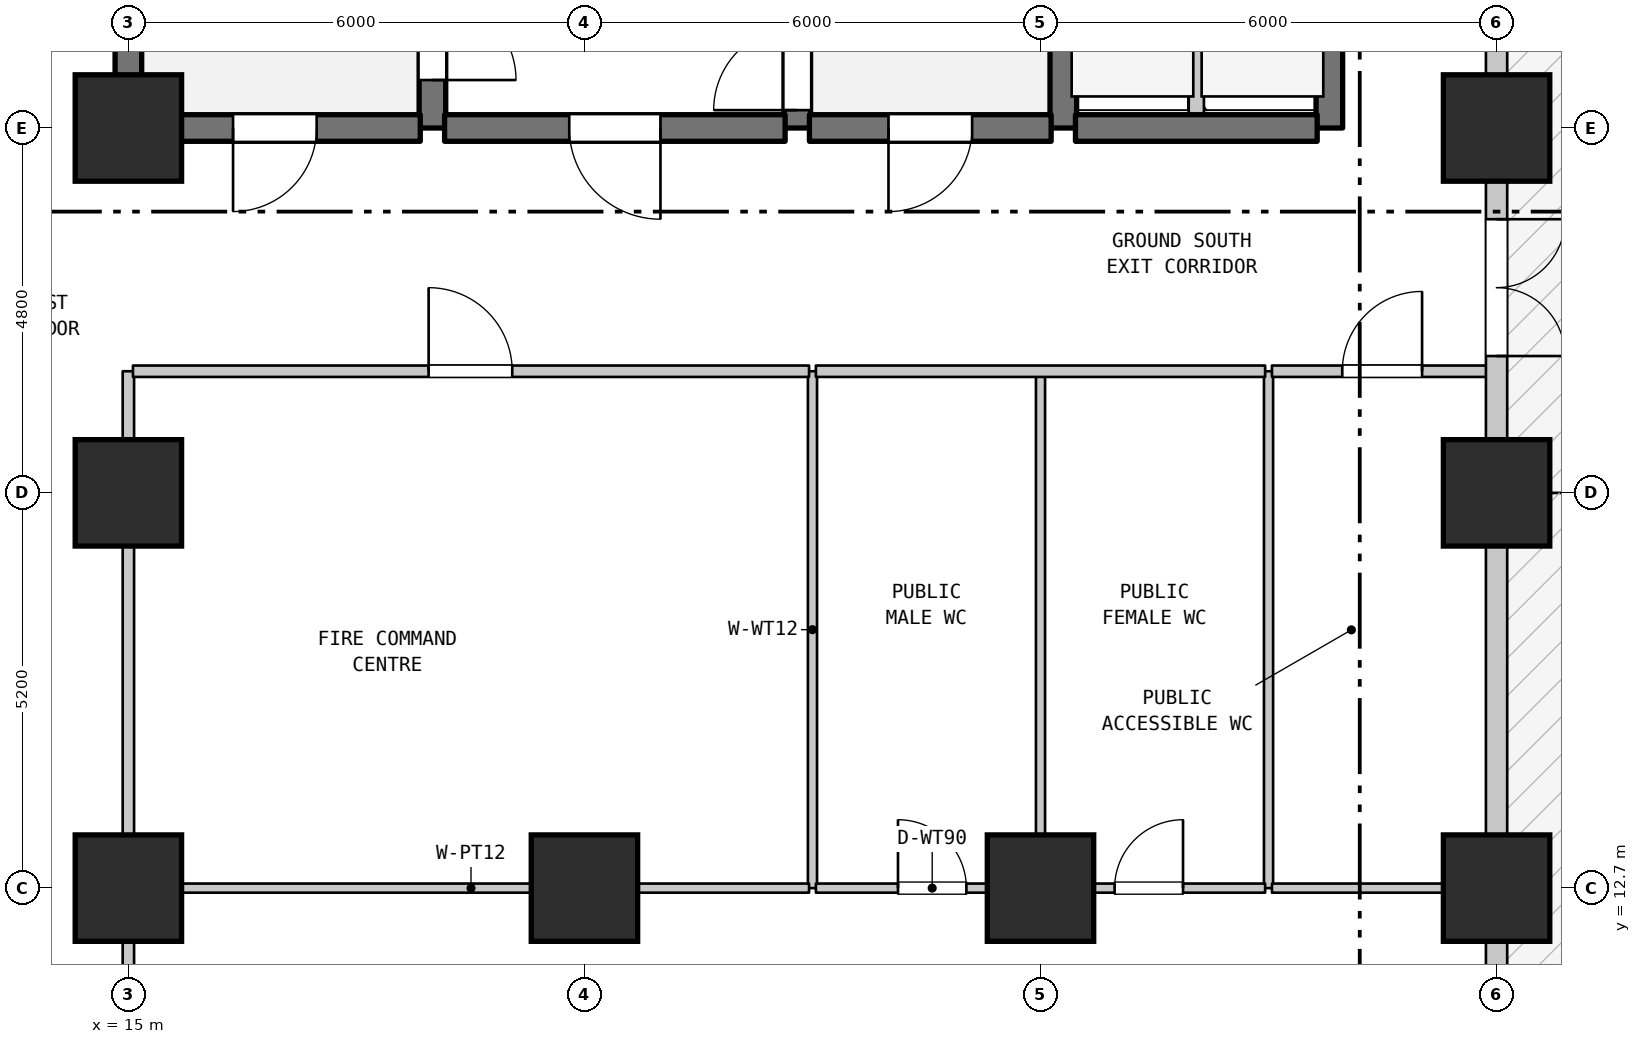
"""IFC4 building model, lengths in metres.
Left out: names, types, materials, properties, quantities, classifications, styles, units other than length and angle.
Written with IfcOpenShell. Run it as: python <this file> out.ifc"""

import sys

from ifc_helpers import new_model, si_unit, direction, frame, frame_2d, origin, origin_2d, place, context, subcontext, project, spatial, rectangle, extrude, element, fill, save


model = new_model("IFC4")
c1 = context("Model", 3, precision=1e-05, world=origin(), true_north=direction((0.0, 1.0)))
c2 = subcontext(c1, "Body", "Model", "MODEL_VIEW")
j1 = project(units=[si_unit("LENGTHUNIT", "METRE"), si_unit("PLANEANGLEUNIT", "RADIAN")], contexts=[c1])
p1 = place(None, origin())
s1 = spatial("IfcSite", under=j1, at=p1, CompositionType="ELEMENT")
p2 = place(p1, origin())
s2 = spatial("IfcBuilding", under=s1, at=p2, CompositionType="ELEMENT")
p3 = place(p2, origin())
s3 = spatial("IfcBuildingStorey", under=s2, at=p3, CompositionType="ELEMENT", Elevation=0.0)
for number, where, z_axis, x_axis in (
    (1, (15.0, 12.7, 0.0), (0.0, 0.0, 1.0), (1.0, 0.0, 0.0)),
    (2, (15.0, 17.9, 0.0), (0.0, 0.0, 1.0), (1.0, 0.0, 0.0)),
    (3, (15.0, 22.7, 0.0), (0.0, 0.0, 1.0), (1.0, 0.0, 0.0)),
    (4, (21.0, 12.7, 0.0), (0.0, 0.0, 1.0), (1.0, 0.0, 0.0)),
    (5, (27.0, 12.7, 0.0), (0.0, 0.0, 1.0), (1.0, 0.0, 0.0)),
):
    element("IfcColumn", number, at=place(p3, frame(where, z_axis=z_axis, x_axis=x_axis)), inside=s3, PredefinedType="COLUMN", context=c2, shape_type="SweptSolid", body=[
        extrude(rectangle(XDim=1.4, YDim=1.4, at=origin_2d()), origin(), (0.0, 0.0, 1.0), 6.5),
    ])
for number, where, z_axis, x_axis in (
    (6, (33.0, 12.7, 0.0), (0.0, 0.0, 1.0), (1.0, 0.0, 0.0)),
    (7, (33.0, 17.9, 0.0), (0.0, 0.0, 1.0), (1.0, 0.0, 0.0)),
    (8, (33.0, 22.7, 0.0), (0.0, 0.0, 1.0), (1.0, 0.0, 0.0)),
):
    element("IfcColumn", number, at=place(p3, frame(where, z_axis=z_axis, x_axis=x_axis)), inside=s3, PredefinedType="PILASTER", context=c2, shape_type="SweptSolid", body=[
        extrude(rectangle(XDim=1.4, YDim=1.4, at=origin_2d()), origin(), (0.0, 0.0, 1.0), 6.5),
    ])
p4 = place(p3, frame((15.0, 0.71, 0.0), z_axis=(0.0, 0.0, 1.0), x_axis=(0.0, 1.0, 0.0)))
e9 = element("IfcWall", 9, at=p4, inside=s3, PredefinedType="STANDARD", context=c2, shape_type="SweptSolid", body=[
    extrude(rectangle(XDim=11.99, YDim=0.15, at=frame_2d((5.995, 0.0))), origin(), (0.0, 0.0, 1.0), 6.17),
])
p5 = place(p4, frame((5.119, 0.0, 0.0)))
e10 = element("IfcOpeningElement", 10, at=p5, cuts=e9, PredefinedType="OPENING", context=c2, shape_type="SweptSolid", body=[
    extrude(rectangle(XDim=1.2, YDim=2.2, at=frame_2d((0.6, 1.1))), frame((0.0, 0.085, 0.0), z_axis=(0.0, -1.0, 0.0), x_axis=(1.0, 0.0, 0.0)), (0.0, 0.0, 1.0), 0.17),
])
p6 = place(p3, frame((15.0, 12.7, 0.0), z_axis=(0.0, 0.0, 1.0), x_axis=(0.0, 1.0, 0.0)))
e11 = element("IfcWall", 11, at=p6, inside=s3, PredefinedType="STANDARD", context=c2, shape_type="SweptSolid", body=[
    extrude(rectangle(XDim=6.8, YDim=0.15, at=frame_2d((3.4, 0.0))), origin(), (0.0, 0.0, 1.0), 5.67),
])
p7 = place(p3, frame((15.0, 22.7, 0.0), z_axis=(0.0, 0.0, 1.0), x_axis=(0.0, 1.0, 0.0)))
e12 = element("IfcWall", 12, at=p7, inside=s3, PredefinedType="SHEAR", context=c2, shape_type="SweptSolid", body=[
    extrude(rectangle(XDim=6.8, YDim=0.35, at=frame_2d((3.4, 0.0))), origin(), (0.0, 0.0, 1.0), 6.17),
])
p8 = place(p3, frame((19.0, 22.7, 0.0), z_axis=(0.0, 0.0, 1.0), x_axis=(0.0, 1.0, 0.0)))
e13 = element("IfcWall", 13, at=p8, inside=s3, PredefinedType="SHEAR", context=c2, shape_type="SweptSolid", body=[
    extrude(rectangle(XDim=5.5, YDim=0.35, at=frame_2d((2.75, 0.0))), origin(), (0.0, 0.0, 1.0), 6.17),
])
p9 = place(p8, frame((0.631, 0.0, 0.0)))
e14 = element("IfcOpeningElement", 14, at=p9, cuts=e13, PredefinedType="OPENING", context=c2, shape_type="SweptSolid", body=[
    extrude(rectangle(XDim=1.1, YDim=2.15, at=frame_2d((0.55, 1.075))), frame((0.0, 0.185, 0.0), z_axis=(0.0, -1.0, 0.0), x_axis=(1.0, 0.0, 0.0)), (0.0, 0.0, 1.0), 0.37),
])
p10 = place(p3, frame((23.8, 22.7, 0.0), z_axis=(0.0, 0.0, 1.0), x_axis=(0.0, 1.0, 0.0)))
e15 = element("IfcWall", 15, at=p10, inside=s3, PredefinedType="SHEAR", context=c2, shape_type="SweptSolid", body=[
    extrude(rectangle(XDim=5.5, YDim=0.35, at=frame_2d((2.75, 0.0))), origin(), (0.0, 0.0, 1.0), 6.17),
])
p11 = place(p10, frame((0.235, 0.0, 0.0)))
e16 = element("IfcOpeningElement", 16, at=p11, cuts=e15, PredefinedType="OPENING", context=c2, shape_type="SweptSolid", body=[
    extrude(rectangle(XDim=1.1, YDim=2.15, at=frame_2d((0.55, 1.075))), frame((0.0, 0.185, 0.0), z_axis=(0.0, -1.0, 0.0), x_axis=(1.0, 0.0, 0.0)), (0.0, 0.0, 1.0), 0.37),
])
for number, where, z_axis, x_axis in (
    (17, (24.0, 12.7, 0.0), (0.0, 0.0, 1.0), (0.0, 1.0, 0.0)),
    (18, (27.0, 12.7, 0.0), (0.0, 0.0, 1.0), (0.0, 1.0, 0.0)),
):
    element("IfcWall", number, at=place(p3, frame(where, z_axis=z_axis, x_axis=x_axis)), inside=s3, PredefinedType="PARTITIONING", context=c2, shape_type="SweptSolid", body=[
        extrude(rectangle(XDim=6.8, YDim=0.12, at=frame_2d((3.4, 0.0))), origin(), (0.0, 0.0, 1.0), 6.17),
    ])
p12 = place(p3, frame((27.3, 22.7, 0.0), z_axis=(0.0, 0.0, 1.0), x_axis=(0.0, 1.0, 0.0)))
e19 = element("IfcWall", 19, at=p12, inside=s3, PredefinedType="SHEAR", context=c2, shape_type="SweptSolid", body=[
    extrude(rectangle(XDim=2.9, YDim=0.35, at=frame_2d((1.45, 0.0))), origin(), (0.0, 0.0, 1.0), 6.17),
])
p13 = place(p3, frame((29.05, 22.7, 0.0), z_axis=(0.0, 0.0, 1.0), x_axis=(0.0, 1.0, 0.0)))
e20 = element("IfcWall", 20, at=p13, inside=s3, PredefinedType="STANDARD", context=c2, shape_type="SweptSolid", body=[
    extrude(rectangle(XDim=2.9, YDim=0.2, at=frame_2d((1.45, 0.0))), origin(), (0.0, 0.0, 1.0), 6.17),
])
p14 = place(p3, frame((30.0, 12.7, 0.0), z_axis=(0.0, 0.0, 1.0), x_axis=(0.0, 1.0, 0.0)))
e21 = element("IfcWall", 21, at=p14, inside=s3, PredefinedType="PARTITIONING", context=c2, shape_type="SweptSolid", body=[
    extrude(rectangle(XDim=6.8, YDim=0.12, at=frame_2d((3.4, 0.0))), origin(), (0.0, 0.0, 1.0), 6.17),
])
p15 = place(p3, frame((30.8, 22.7, 0.0), z_axis=(0.0, 0.0, 1.0), x_axis=(0.0, 1.0, 0.0)))
e22 = element("IfcWall", 22, at=p15, inside=s3, PredefinedType="SHEAR", context=c2, shape_type="SweptSolid", body=[
    extrude(rectangle(XDim=2.9, YDim=0.35, at=frame_2d((1.45, 0.0))), origin(), (0.0, 0.0, 1.0), 6.17),
])
p16 = place(p3, frame((15.06, 12.7, 0.0), z_axis=(0.0, 0.0, 1.0), x_axis=(1.0, 0.0, 0.0)))
e23 = element("IfcWall", 23, at=p16, inside=s3, PredefinedType="PARTITIONING", context=c2, shape_type="SweptSolid", body=[
    extrude(rectangle(XDim=8.895, YDim=0.12, at=frame_2d((4.448, 0.0))), origin(), (0.0, 0.0, 1.0), 6.17),
])
p17 = place(p3, frame((24.045, 12.7, 0.0), z_axis=(0.0, 0.0, 1.0), x_axis=(1.0, 0.0, 0.0)))
e24 = element("IfcWall", 24, at=p17, inside=s3, PredefinedType="PARTITIONING", context=c2, shape_type="SweptSolid", body=[
    extrude(rectangle(XDim=5.91, YDim=0.12, at=frame_2d((2.955, 0.0))), origin(), (0.0, 0.0, 1.0), 6.17),
])
p18 = place(p17, frame((1.08, 0.0, 0.0)))
e25 = element("IfcOpeningElement", 25, at=p18, cuts=e24, PredefinedType="OPENING", context=c2, shape_type="SweptSolid", body=[
    extrude(rectangle(XDim=0.9, YDim=2.1, at=frame_2d((0.45, 1.05))), frame((0.0, 0.07, 0.0), z_axis=(0.0, -1.0, 0.0), x_axis=(1.0, 0.0, 0.0)), (0.0, 0.0, 1.0), 0.14),
])
p19 = place(p17, frame((3.93, 0.0, 0.0)))
e26 = element("IfcOpeningElement", 26, at=p19, cuts=e24, PredefinedType="OPENING", context=c2, shape_type="SweptSolid", body=[
    extrude(rectangle(XDim=0.9, YDim=2.1, at=frame_2d((0.45, 1.05))), frame((0.0, 0.07, 0.0), z_axis=(0.0, -1.0, 0.0), x_axis=(1.0, 0.0, 0.0)), (0.0, 0.0, 1.0), 0.14),
])
p20 = place(p3, frame((30.045, 12.7, 0.0), z_axis=(0.0, 0.0, 1.0), x_axis=(1.0, 0.0, 0.0)))
e27 = element("IfcWall", 27, at=p20, inside=s3, PredefinedType="PARTITIONING", context=c2, shape_type="SweptSolid", body=[
    extrude(rectangle(XDim=2.945, YDim=0.12, at=frame_2d((1.473, 0.0))), origin(), (0.0, 0.0, 1.0), 6.17),
])
p21 = place(p3, frame((15.06, 19.5, 0.0), z_axis=(0.0, 0.0, 1.0), x_axis=(1.0, 0.0, 0.0)))
e28 = element("IfcWall", 28, at=p21, inside=s3, PredefinedType="STANDARD", context=c2, shape_type="SweptSolid", body=[
    extrude(rectangle(XDim=8.895, YDim=0.15, at=frame_2d((4.448, 0.0))), origin(), (0.0, 0.0, 1.0), 6.17),
])
p22 = place(p21, frame((3.89, 0.0, 0.0)))
e29 = element("IfcOpeningElement", 29, at=p22, cuts=e28, PredefinedType="OPENING", context=c2, shape_type="SweptSolid", body=[
    extrude(rectangle(XDim=1.1, YDim=2.15, at=frame_2d((0.55, 1.075))), frame((0.0, 0.085, 0.0), z_axis=(0.0, -1.0, 0.0), x_axis=(1.0, 0.0, 0.0)), (0.0, 0.0, 1.0), 0.17),
])
p23 = place(p3, frame((24.045, 19.5, 0.0), z_axis=(0.0, 0.0, 1.0), x_axis=(1.0, 0.0, 0.0)))
e30 = element("IfcWall", 30, at=p23, inside=s3, PredefinedType="STANDARD", context=c2, shape_type="SweptSolid", body=[
    extrude(rectangle(XDim=5.91, YDim=0.15, at=frame_2d((2.955, 0.0))), origin(), (0.0, 0.0, 1.0), 6.17),
])
p24 = place(p3, frame((30.045, 19.5, 0.0), z_axis=(0.0, 0.0, 1.0), x_axis=(1.0, 0.0, 0.0)))
e31 = element("IfcWall", 31, at=p24, inside=s3, PredefinedType="STANDARD", context=c2, shape_type="SweptSolid", body=[
    extrude(rectangle(XDim=2.945, YDim=0.15, at=frame_2d((1.473, 0.0))), origin(), (0.0, 0.0, 1.0), 6.17),
])
p25 = place(p24, frame((0.925, 0.0, 0.0)))
e32 = element("IfcOpeningElement", 32, at=p25, cuts=e31, PredefinedType="OPENING", context=c2, shape_type="SweptSolid", body=[
    extrude(rectangle(XDim=1.05, YDim=2.15, at=frame_2d((0.525, 1.075))), frame((0.0, 0.085, 0.0), z_axis=(0.0, -1.0, 0.0), x_axis=(1.0, 0.0, 0.0)), (0.0, 0.0, 1.0), 0.17),
])
p26 = place(p3, frame((15.16, 22.7, 0.0), z_axis=(0.0, 0.0, 1.0), x_axis=(1.0, 0.0, 0.0)))
e33 = element("IfcWall", 33, at=p26, inside=s3, PredefinedType="SHEAR", context=c2, shape_type="SweptSolid", body=[
    extrude(rectangle(XDim=3.68, YDim=0.35, at=frame_2d((1.84, 0.0))), origin(), (0.0, 0.0, 1.0), 6.17),
])
p27 = place(p26, frame((1.217, 0.0, 0.0)))
e34 = element("IfcOpeningElement", 34, at=p27, cuts=e33, PredefinedType="OPENING", context=c2, shape_type="SweptSolid", body=[
    extrude(rectangle(XDim=1.1, YDim=2.15, at=frame_2d((0.55, 1.075))), frame((0.0, 0.185, 0.0), z_axis=(0.0, -1.0, 0.0), x_axis=(1.0, 0.0, 0.0)), (0.0, 0.0, 1.0), 0.37),
])
p28 = place(p3, frame((19.16, 22.7, 0.0), z_axis=(0.0, 0.0, 1.0), x_axis=(1.0, 0.0, 0.0)))
e35 = element("IfcWall", 35, at=p28, inside=s3, PredefinedType="SHEAR", context=c2, shape_type="SweptSolid", body=[
    extrude(rectangle(XDim=4.48, YDim=0.35, at=frame_2d((2.24, 0.0))), origin(), (0.0, 0.0, 1.0), 6.17),
])
p29 = place(p28, frame((1.64, 0.0, 0.0)))
e36 = element("IfcOpeningElement", 36, at=p29, cuts=e35, PredefinedType="OPENING", context=c2, shape_type="SweptSolid", body=[
    extrude(rectangle(XDim=1.2, YDim=2.2, at=frame_2d((0.6, 1.1))), frame((0.0, 0.185, 0.0), z_axis=(0.0, -1.0, 0.0), x_axis=(1.0, 0.0, 0.0)), (0.0, 0.0, 1.0), 0.37),
])
p30 = place(p3, frame((23.96, 22.7, 0.0), z_axis=(0.0, 0.0, 1.0), x_axis=(1.0, 0.0, 0.0)))
e37 = element("IfcWall", 37, at=p30, inside=s3, PredefinedType="SHEAR", context=c2, shape_type="SweptSolid", body=[
    extrude(rectangle(XDim=3.18, YDim=0.35, at=frame_2d((1.59, 0.0))), origin(), (0.0, 0.0, 1.0), 6.17),
])
p31 = place(p30, frame((1.04, 0.0, 0.0)))
e38 = element("IfcOpeningElement", 38, at=p31, cuts=e37, PredefinedType="OPENING", context=c2, shape_type="SweptSolid", body=[
    extrude(rectangle(XDim=1.1, YDim=2.15, at=frame_2d((0.55, 1.075))), frame((0.0, 0.185, 0.0), z_axis=(0.0, -1.0, 0.0), x_axis=(1.0, 0.0, 0.0)), (0.0, 0.0, 1.0), 0.37),
])
p32 = place(p3, frame((27.46, 22.7, 0.0), z_axis=(0.0, 0.0, 1.0), x_axis=(1.0, 0.0, 0.0)))
e39 = element("IfcWall", 39, at=p32, inside=s3, PredefinedType="SHEAR", context=c2, shape_type="SweptSolid", body=[
    extrude(rectangle(XDim=3.18, YDim=0.35, at=frame_2d((1.59, 0.0))), origin(), (0.0, 0.0, 1.0), 6.17),
])
p33 = place(p3, frame((33.0, 27.9, 0.0), z_axis=(0.0, 0.0, 1.0), x_axis=(0.0, -1.0, 0.0)))
e40 = element("IfcWall", 40, at=p33, inside=s3, PredefinedType="STANDARD", context=c2, shape_type="SweptSolid", body=[
    extrude(rectangle(XDim=27.2, YDim=0.28, at=frame_2d((13.6, 0.0))), origin(), (0.0, 0.0, 1.0), 5.67),
])
p34 = place(p33, frame((17.3, 0.0, 0.0)))
e41 = element("IfcOpeningElement", 41, at=p34, cuts=e40, PredefinedType="OPENING", context=c2, shape_type="SweptSolid", body=[
    extrude(rectangle(XDim=1.8, YDim=2.4, at=frame_2d((0.9, 1.2))), frame((0.0, 0.15, 0.0), z_axis=(0.0, -1.0, 0.0), x_axis=(1.0, 0.0, 0.0)), (0.0, 0.0, 1.0), 0.3),
])
p35 = place(p33, frame((6.4, 0.0, 0.0)))
e42 = element("IfcOpeningElement", 42, at=p35, cuts=e40, PredefinedType="OPENING", context=c2, shape_type="SweptSolid", body=[
    extrude(rectangle(XDim=1.8, YDim=2.4, at=frame_2d((0.9, 1.2))), frame((0.0, 0.15, 0.0), z_axis=(0.0, -1.0, 0.0), x_axis=(1.0, 0.0, 0.0)), (0.0, 0.0, 1.0), 0.3),
])
p36 = place(p33, frame((1.338, 0.0, 0.9)))
e43 = element("IfcOpeningElement", 43, at=p36, cuts=e40, PredefinedType="OPENING", context=c2, shape_type="SweptSolid", body=[
    extrude(rectangle(XDim=2.4, YDim=2.4, at=frame_2d((1.2, 1.2))), frame((0.0, 0.15, 0.0), z_axis=(0.0, -1.0, 0.0), x_axis=(1.0, 0.0, 0.0)), (0.0, 0.0, 1.0), 0.3),
])
p37 = place(p33, frame((22.762, 0.0, 0.9)))
e44 = element("IfcOpeningElement", 44, at=p37, cuts=e40, PredefinedType="OPENING", context=c2, shape_type="SweptSolid", body=[
    extrude(rectangle(XDim=2.4, YDim=2.4, at=frame_2d((1.2, 1.2))), frame((0.0, 0.15, 0.0), z_axis=(0.0, -1.0, 0.0), x_axis=(1.0, 0.0, 0.0)), (0.0, 0.0, 1.0), 0.3),
])
p38 = place(p35, origin())
e45 = element("IfcDoor", 45, at=p38, inside=s3, OperationType="DOUBLE_DOOR_SINGLE_SWING", PredefinedType="DOOR", context=c2, shape_type="SweptSolid", body=[
    extrude(rectangle(XDim=1.8, YDim=2.4, at=frame_2d((0.9, 1.2))), frame((0.0, 0.025, 0.0), z_axis=(0.0, -1.0, 0.0), x_axis=(1.0, 0.0, 0.0)), (0.0, 0.0, 1.0), 0.05),
])
fill(e42, e45)
p39 = place(p9, frame((1.1, 0.0, 0.0), z_axis=(0.0, 0.0, 1.0), x_axis=(-1.0, 0.0, 0.0)))
e46 = element("IfcDoor", 46, at=p39, inside=s3, OperationType="SINGLE_SWING_LEFT", PredefinedType="DOOR", context=c2, shape_type="SweptSolid", body=[
    extrude(rectangle(XDim=1.1, YDim=2.15, at=frame_2d((0.55, 1.075))), frame((0.0, 0.025, 0.0), z_axis=(0.0, -1.0, 0.0), x_axis=(1.0, 0.0, 0.0)), (0.0, 0.0, 1.0), 0.05),
])
fill(e14, e46)
p40 = place(p11, origin())
e47 = element("IfcDoor", 47, at=p40, inside=s3, OperationType="SINGLE_SWING_LEFT", PredefinedType="DOOR", context=c2, shape_type="SweptSolid", body=[
    extrude(rectangle(XDim=1.1, YDim=2.15, at=frame_2d((0.55, 1.075))), frame((0.0, 0.025, 0.0), z_axis=(0.0, -1.0, 0.0), x_axis=(1.0, 0.0, 0.0)), (0.0, 0.0, 1.0), 0.05),
])
fill(e16, e47)
p41 = place(p18, origin())
e48 = element("IfcDoor", 48, at=p41, inside=s3, OperationType="SINGLE_SWING_LEFT", PredefinedType="DOOR", context=c2, shape_type="SweptSolid", body=[
    extrude(rectangle(XDim=0.9, YDim=2.1, at=frame_2d((0.45, 1.05))), frame((0.0, 0.025, 0.0), z_axis=(0.0, -1.0, 0.0), x_axis=(1.0, 0.0, 0.0)), (0.0, 0.0, 1.0), 0.05),
])
fill(e25, e48)
p42 = place(p19, origin())
e49 = element("IfcDoor", 49, at=p42, inside=s3, OperationType="SINGLE_SWING_RIGHT", PredefinedType="DOOR", context=c2, shape_type="SweptSolid", body=[
    extrude(rectangle(XDim=0.9, YDim=2.1, at=frame_2d((0.45, 1.05))), frame((0.0, 0.025, 0.0), z_axis=(0.0, -1.0, 0.0), x_axis=(1.0, 0.0, 0.0)), (0.0, 0.0, 1.0), 0.05),
])
fill(e26, e49)
p43 = place(p22, origin())
e50 = element("IfcDoor", 50, at=p43, inside=s3, OperationType="SINGLE_SWING_LEFT", PredefinedType="DOOR", context=c2, shape_type="SweptSolid", body=[
    extrude(rectangle(XDim=1.1, YDim=2.15, at=frame_2d((0.55, 1.075))), frame((0.0, 0.025, 0.0), z_axis=(0.0, -1.0, 0.0), x_axis=(1.0, 0.0, 0.0)), (0.0, 0.0, 1.0), 0.05),
])
fill(e29, e50)
p44 = place(p25, origin())
e51 = element("IfcDoor", 51, at=p44, inside=s3, OperationType="SINGLE_SWING_RIGHT", PredefinedType="DOOR", context=c2, shape_type="SweptSolid", body=[
    extrude(rectangle(XDim=1.05, YDim=2.15, at=frame_2d((0.525, 1.075))), frame((0.0, 0.025, 0.0), z_axis=(0.0, -1.0, 0.0), x_axis=(1.0, 0.0, 0.0)), (0.0, 0.0, 1.0), 0.05),
])
fill(e32, e51)
p45 = place(p27, frame((1.1, 0.0, 0.0), z_axis=(0.0, 0.0, 1.0), x_axis=(-1.0, 0.0, 0.0)))
e52 = element("IfcDoor", 52, at=p45, inside=s3, OperationType="SINGLE_SWING_LEFT", PredefinedType="DOOR", context=c2, shape_type="SweptSolid", body=[
    extrude(rectangle(XDim=1.1, YDim=2.15, at=frame_2d((0.55, 1.075))), frame((0.0, 0.025, 0.0), z_axis=(0.0, -1.0, 0.0), x_axis=(1.0, 0.0, 0.0)), (0.0, 0.0, 1.0), 0.05),
])
fill(e34, e52)
p46 = place(p29, frame((1.2, 0.0, 0.0), z_axis=(0.0, 0.0, 1.0), x_axis=(-1.0, 0.0, 0.0)))
e53 = element("IfcDoor", 53, at=p46, inside=s3, OperationType="SINGLE_SWING_RIGHT", PredefinedType="DOOR", context=c2, shape_type="SweptSolid", body=[
    extrude(rectangle(XDim=1.2, YDim=2.2, at=frame_2d((0.6, 1.1))), frame((0.0, 0.025, 0.0), z_axis=(0.0, -1.0, 0.0), x_axis=(1.0, 0.0, 0.0)), (0.0, 0.0, 1.0), 0.05),
])
fill(e36, e53)
p47 = place(p31, frame((1.1, 0.0, 0.0), z_axis=(0.0, 0.0, 1.0), x_axis=(-1.0, 0.0, 0.0)))
e54 = element("IfcDoor", 54, at=p47, inside=s3, OperationType="SINGLE_SWING_LEFT", PredefinedType="DOOR", context=c2, shape_type="SweptSolid", body=[
    extrude(rectangle(XDim=1.1, YDim=2.15, at=frame_2d((0.55, 1.075))), frame((0.0, 0.025, 0.0), z_axis=(0.0, -1.0, 0.0), x_axis=(1.0, 0.0, 0.0)), (0.0, 0.0, 1.0), 0.05),
])
fill(e38, e54)
save(model, sys.argv[1])
